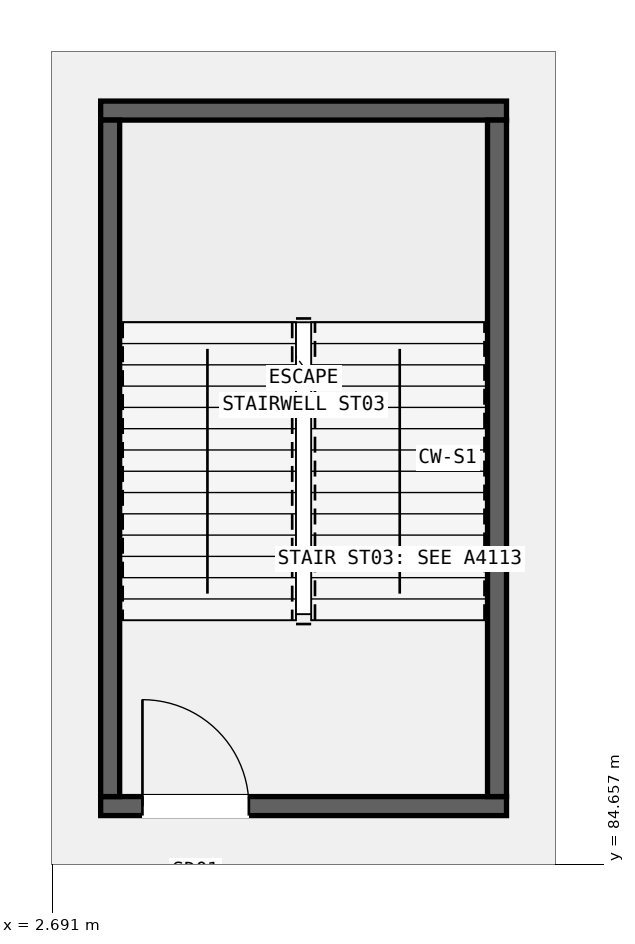
"""IFC4 building model, lengths in metres.
Left out: names, types, materials, properties, quantities, classifications, styles, units other than length and angle.
Written with IfcOpenShell. Run it as: python <this file> out.ifc"""

import sys

from ifc_helpers import new_model, si_unit, direction, frame, frame_2d, origin, place, context, subcontext, project, spatial, rectangle, extrude, element, fill, save


model = new_model("IFC4")
c1 = context("Model", 3, precision=1e-05, world=origin(), true_north=direction((0.0, 1.0)))
c2 = subcontext(c1, "Body", "Model", "MODEL_VIEW")
j1 = project(units=[si_unit("LENGTHUNIT", "METRE"), si_unit("PLANEANGLEUNIT", "RADIAN")], contexts=[c1])
p1 = place(None, origin())
s1 = spatial("IfcSite", under=j1, at=p1, CompositionType="ELEMENT")
p2 = place(p1, origin())
s2 = spatial("IfcBuilding", under=s1, at=p2, CompositionType="ELEMENT")
p3 = place(p2, frame((0.0, 0.0, 5.4)))
s3 = spatial("IfcBuildingStorey", under=s2, at=p3, CompositionType="ELEMENT", Elevation=5.4)
p4 = place(p3, frame((3.33, 85.425, 0.0), z_axis=(0.0, 0.0, 1.0), x_axis=(1.0, 0.0, 0.0)))
e1 = element("IfcWall", 1, at=p4, inside=s3, PredefinedType="SHEAR", context=c2, shape_type="SweptSolid", body=[
    extrude(rectangle(XDim=5.34, YDim=0.25, at=frame_2d((2.67, 0.0))), origin(), (0.0, 0.0, 1.0), 4.55),
])
p5 = place(p4, frame((0.55, 0.0, 0.0)))
e2 = element("IfcOpeningElement", 2, at=p5, cuts=e1, PredefinedType="OPENING", context=c2, shape_type="SweptSolid", body=[
    extrude(rectangle(XDim=1.4, YDim=2.15, at=frame_2d((0.7, 1.075))), frame((0.0, 0.135, 0.0), z_axis=(0.0, -1.0, 0.0), x_axis=(1.0, 0.0, 0.0)), (0.0, 0.0, 1.0), 0.27),
])
p6 = place(p3, frame((3.33, 94.575, 0.0), z_axis=(0.0, 0.0, 1.0), x_axis=(1.0, 0.0, 0.0)))
e3 = element("IfcWall", 3, at=p6, inside=s3, PredefinedType="SHEAR", context=c2, shape_type="SweptSolid", body=[
    extrude(rectangle(XDim=5.34, YDim=0.25, at=frame_2d((2.67, 0.0))), origin(), (0.0, 0.0, 1.0), 4.55),
])
for number, where, z_axis, x_axis in (
    (4, (3.455, 85.55, 0.0), (0.0, 0.0, 1.0), (0.0, 1.0, 0.0)),
    (5, (8.545, 85.55, 0.0), (0.0, 0.0, 1.0), (0.0, 1.0, 0.0)),
):
    element("IfcWall", number, at=place(p3, frame(where, z_axis=z_axis, x_axis=x_axis)), inside=s3, PredefinedType="SHEAR", context=c2, shape_type="SweptSolid", body=[
        extrude(rectangle(XDim=8.9, YDim=0.25, at=frame_2d((4.45, 0.0))), origin(), (0.0, 0.0, 1.0), 4.55),
    ])
p7 = place(p5, origin())
e6 = element("IfcDoor", 6, at=p7, inside=s3, OperationType="SINGLE_SWING_LEFT", PredefinedType="DOOR", context=c2, shape_type="SweptSolid", body=[
    extrude(rectangle(XDim=1.4, YDim=2.15, at=frame_2d((0.7, 1.075))), frame((0.0, 0.025, 0.0), z_axis=(0.0, -1.0, 0.0), x_axis=(1.0, 0.0, 0.0)), (0.0, 0.0, 1.0), 0.05),
])
fill(e2, e6)
save(model, sys.argv[1])
